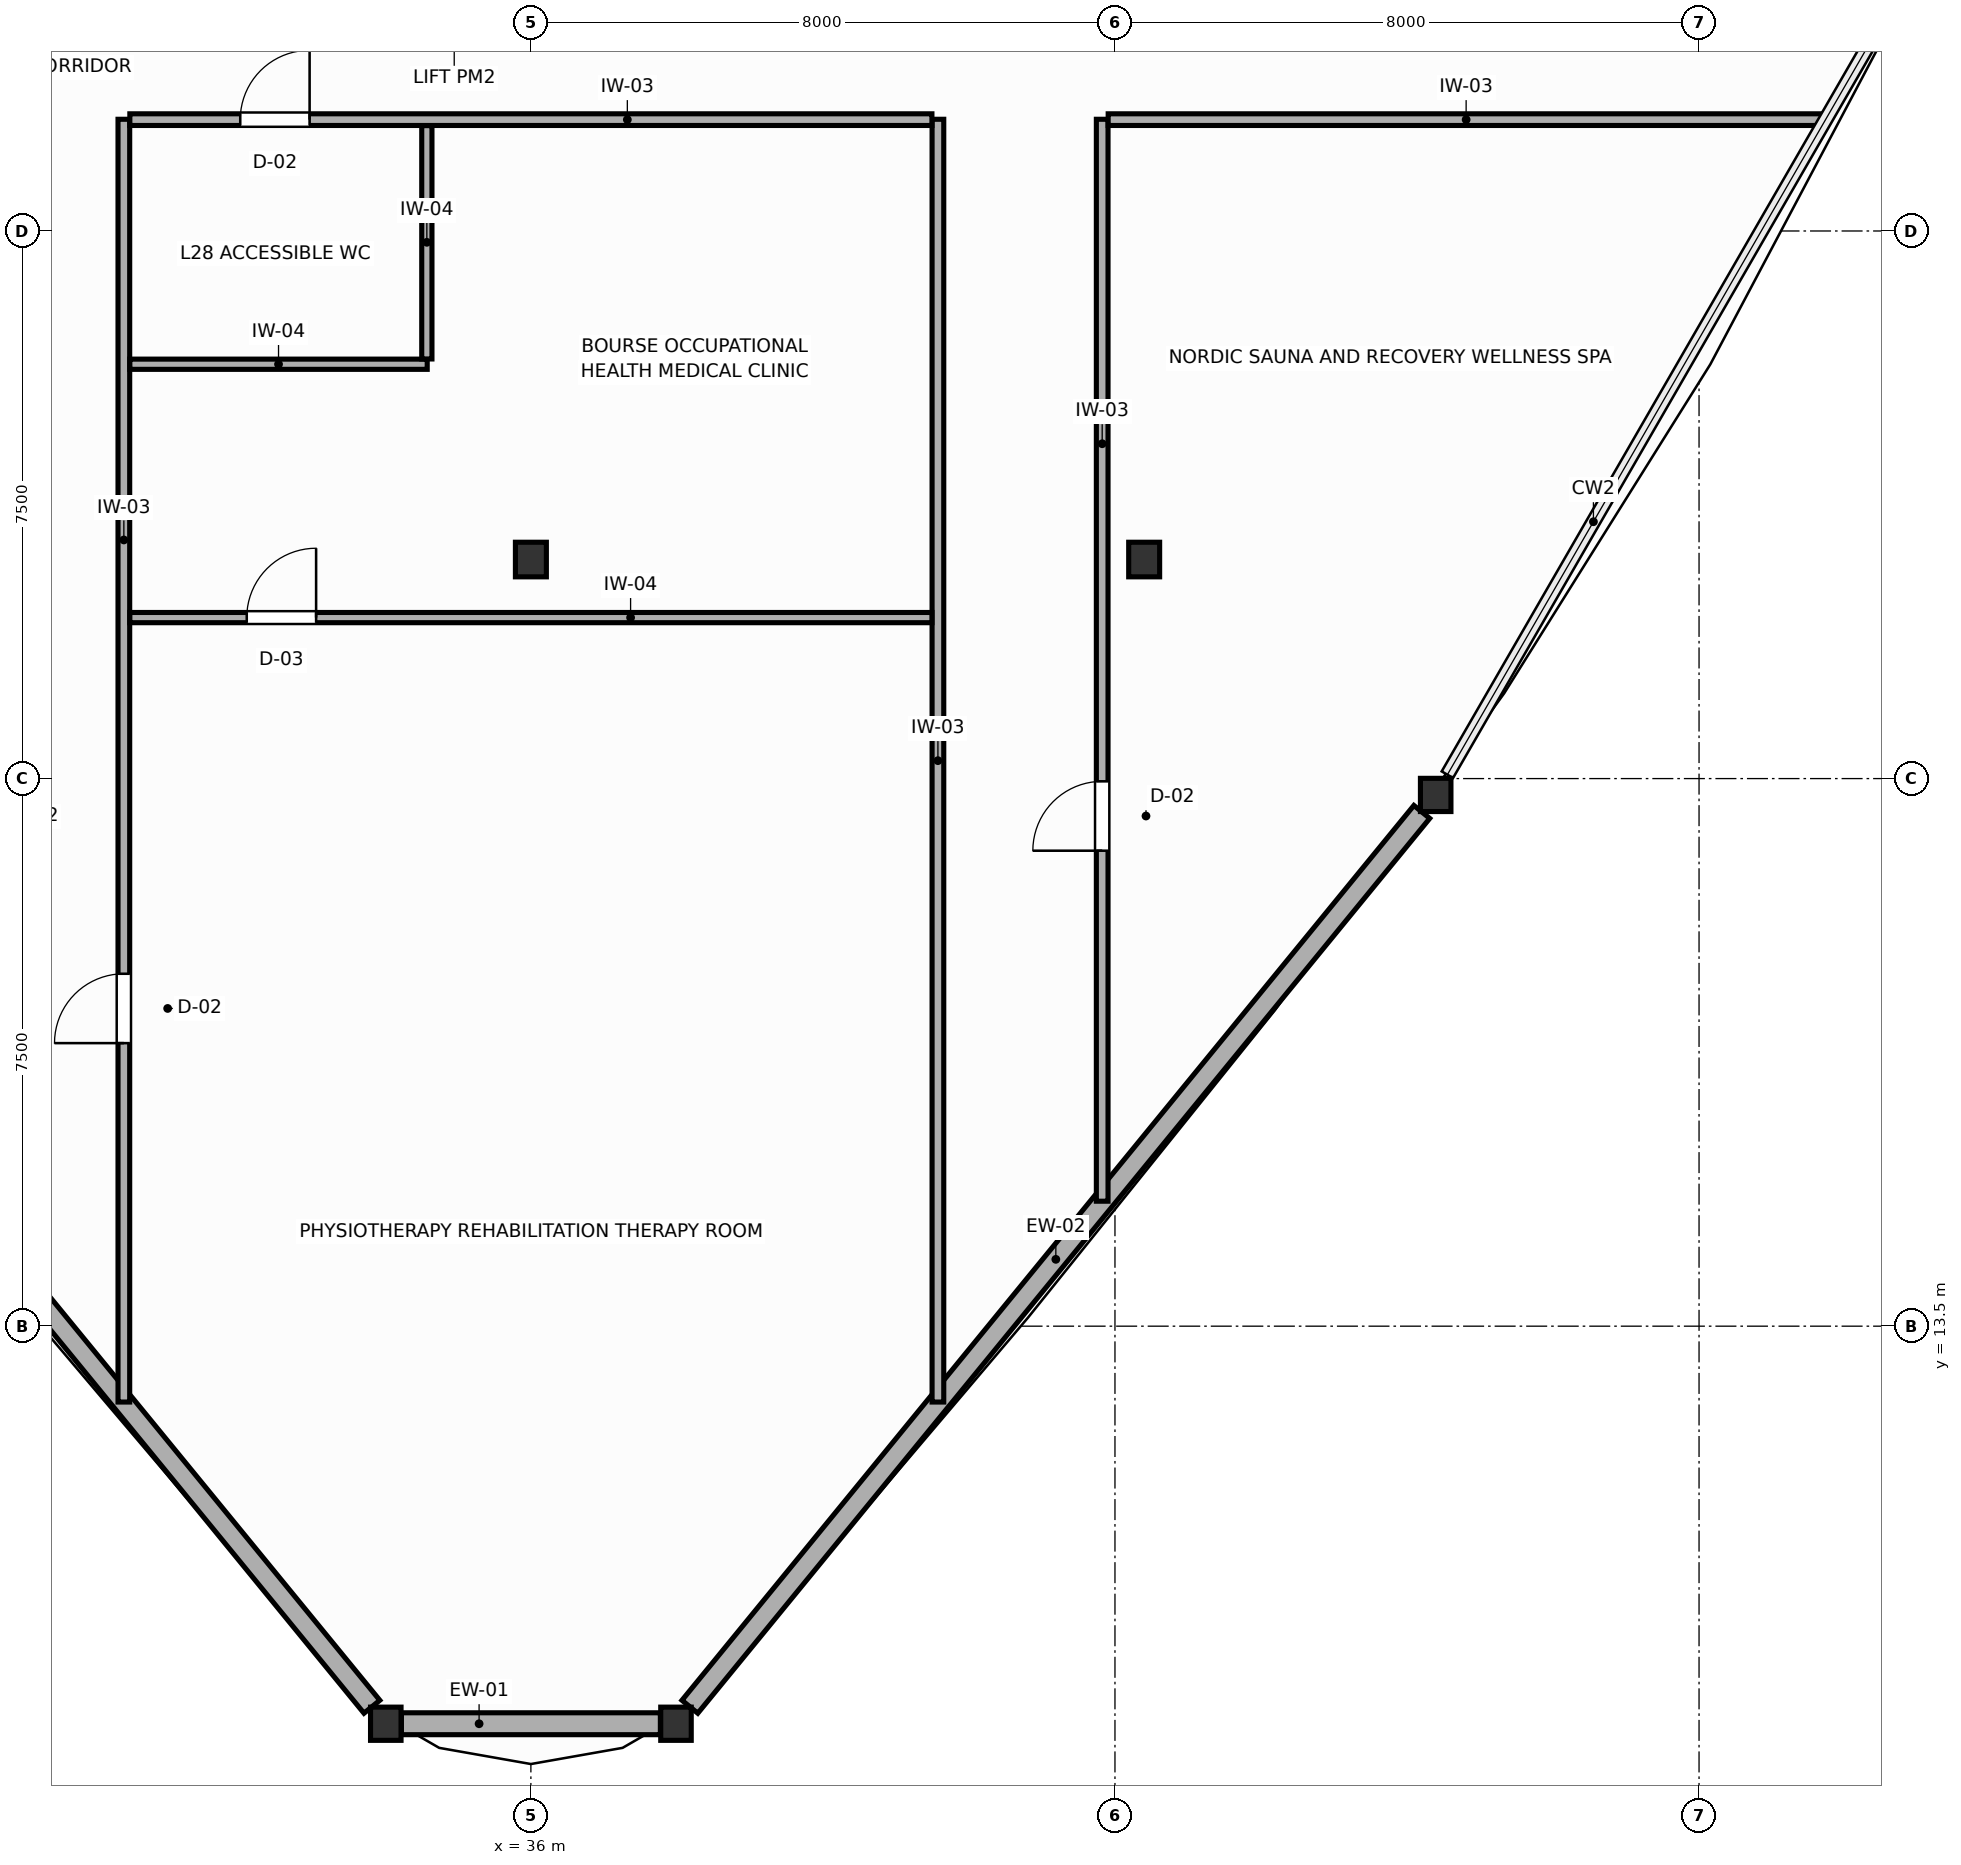
"""IFC4 building model, lengths in metres.
Left out: names, types, materials, properties, quantities, classifications, styles, units other than length and angle.
Written with IfcOpenShell. Run it as: python <this file> out.ifc"""

import sys

from ifc_helpers import new_model, si_unit, direction, frame, frame_2d, origin, origin_2d, place, context, subcontext, project, spatial, rectangle, i_section, extrude, source, transform, mapped, element, fill, save


model = new_model("IFC4")
c1 = context("Model", 3, precision=1e-05, world=origin(), true_north=direction((0.0, 1.0)))
c2 = subcontext(c1, "Body", "Model", "MODEL_VIEW")
j1 = project(units=[si_unit("LENGTHUNIT", "METRE"), si_unit("PLANEANGLEUNIT", "RADIAN")], contexts=[c1])
p1 = place(None, origin())
s1 = spatial("IfcSite", under=j1, at=p1, CompositionType="ELEMENT")
p2 = place(p1, origin())
s2 = spatial("IfcBuilding", under=s1, at=p2, CompositionType="ELEMENT")
p3 = place(p2, frame((0.0, 0.0, 113.4)))
s3 = spatial("IfcBuildingStorey", under=s2, at=p3, CompositionType="ELEMENT", Elevation=113.4)
m1 = source(origin(), c2, "Body", "SweptSolid", [
    extrude(i_section(OverallWidth=0.424, OverallDepth=0.474, WebThickness=0.045, FlangeThickness=0.072, FilletRadius=0.015, at=origin_2d()), origin(), (0.0, 0.0, 1.0), 3.6),
])
for number, where, z_axis, x_axis in (
    (1, (44.4, 24.0, 0.0), (0.0, 0.0, 1.0), (1.0, 0.0, 0.0)),
    (2, (36.0, 24.0, 0.0), (0.0, 0.0, 1.0), (1.0, 0.0, 0.0)),
):
    element("IfcColumn", number, at=place(p3, frame(where, z_axis=z_axis, x_axis=x_axis)), inside=s3, PredefinedType="COLUMN", context=c2, shape_type="MappedRepresentation", body=[
        mapped(m1, transform((0.0, 0.0, 0.0), scale=1.0)),
    ])
m2 = source(origin(), c2, "Body", "SweptSolid", [
    extrude(i_section(OverallWidth=0.418, OverallDepth=0.455, WebThickness=0.039, FlangeThickness=0.063, FilletRadius=0.015, at=origin_2d()), origin(), (0.0, 0.0, 1.0), 3.6),
])
for number, where, z_axis, x_axis in (
    (3, (34.013, 8.055, 0.0), (0.0, 0.0, 1.0), (1.0, 0.0, 0.0)),
    (4, (37.987, 8.055, 0.0), (0.0, 0.0, 1.0), (1.0, 0.0, 0.0)),
    (5, (48.393, 20.776, 0.0), (0.0, 0.0, 1.0), (1.0, 0.0, 0.0)),
):
    element("IfcColumn", number, at=place(p3, frame(where, z_axis=z_axis, x_axis=x_axis)), inside=s3, PredefinedType="COLUMN", context=c2, shape_type="MappedRepresentation", body=[
        mapped(m2, transform((0.0, 0.0, 0.0), scale=1.0)),
    ])
p4 = place(p3, frame((23.797, 20.543, 0.0), z_axis=(0.0, 0.0, 1.0), x_axis=(0.633140387555, -0.774036982092, 0.0)))
e6 = element("IfcWall", 6, at=p4, inside=s3, PredefinedType="SOLIDWALL", context=c2, shape_type="SweptSolid", body=[
    extrude(rectangle(XDim=15.834, YDim=0.28, at=frame_2d((7.917, 0.0))), origin(), (0.0, 0.0, 1.0), 1.87),
])
p5 = place(p3, frame((34.227, 8.055, 0.0), z_axis=(0.0, 0.0, 1.0), x_axis=(1.0, 0.0, 0.0)))
e7 = element("IfcWall", 7, at=p5, inside=s3, PredefinedType="SOLIDWALL", context=c2, shape_type="SweptSolid", body=[
    extrude(rectangle(XDim=3.547, YDim=0.3, at=frame_2d((1.773, 0.0))), origin(), (0.0, 0.0, 1.0), 1.87),
])
p6 = place(p3, frame((38.177, 8.287, 0.0), z_axis=(0.0, 0.0, 1.0), x_axis=(0.633140387555, 0.774036982092, 0.0)))
e8 = element("IfcWall", 8, at=p6, inside=s3, PredefinedType="SOLIDWALL", context=c2, shape_type="SweptSolid", body=[
    extrude(rectangle(XDim=15.834, YDim=0.28, at=frame_2d((7.917, 0.0))), origin(), (0.0, 0.0, 1.0), 1.87),
])
p7 = place(p3, frame((30.425, 12.461, 0.0), z_axis=(0.0, 0.0, 1.0), x_axis=(0.0, 1.0, 0.0)))
e9 = element("IfcWall", 9, at=p7, inside=s3, PredefinedType="PARTITIONING", context=c2, shape_type="SweptSolid", body=[
    extrude(rectangle(XDim=17.569, YDim=0.16, at=frame_2d((8.785, 0.0))), origin(), (0.0, 0.0, 1.0), 3.4),
])
p8 = place(p7, frame((4.916, 0.0, 0.0)))
e10 = element("IfcOpeningElement", 10, at=p8, cuts=e9, PredefinedType="OPENING", context=c2, shape_type="SweptSolid", body=[
    extrude(rectangle(XDim=0.95, YDim=2.05, at=frame_2d((0.475, 1.025))), frame((0.0, 0.09, 0.0), z_axis=(0.0, -1.0, 0.0), x_axis=(1.0, 0.0, 0.0)), (0.0, 0.0, 1.0), 0.18),
])
p9 = place(p3, frame((41.575, 12.461, 0.0), z_axis=(0.0, 0.0, 1.0), x_axis=(0.0, 1.0, 0.0)))
e11 = element("IfcWall", 11, at=p9, inside=s3, PredefinedType="PARTITIONING", context=c2, shape_type="SweptSolid", body=[
    extrude(rectangle(XDim=17.569, YDim=0.16, at=frame_2d((8.785, 0.0))), origin(), (0.0, 0.0, 1.0), 3.4),
])
p10 = place(p3, frame((43.825, 15.212, 0.0), z_axis=(0.0, 0.0, 1.0), x_axis=(0.0, 1.0, 0.0)))
e12 = element("IfcWall", 12, at=p10, inside=s3, PredefinedType="PARTITIONING", context=c2, shape_type="SweptSolid", body=[
    extrude(rectangle(XDim=14.818, YDim=0.16, at=frame_2d((7.409, 0.0))), origin(), (0.0, 0.0, 1.0), 3.4),
])
p11 = place(p10, frame((4.801, 0.0, 0.0)))
e13 = element("IfcOpeningElement", 13, at=p11, cuts=e12, PredefinedType="OPENING", context=c2, shape_type="SweptSolid", body=[
    extrude(rectangle(XDim=0.95, YDim=2.05, at=frame_2d((0.475, 1.025))), frame((0.0, 0.09, 0.0), z_axis=(0.0, -1.0, 0.0), x_axis=(1.0, 0.0, 0.0)), (0.0, 0.0, 1.0), 0.18),
])
p12 = place(p3, frame((30.507, 30.025, 0.0), z_axis=(0.0, 0.0, 1.0), x_axis=(1.0, 0.0, 0.0)))
e14 = element("IfcWall", 14, at=p12, inside=s3, PredefinedType="PARTITIONING", context=c2, shape_type="SweptSolid", body=[
    extrude(rectangle(XDim=10.986, YDim=0.16, at=frame_2d((5.493, 0.0))), origin(), (0.0, 0.0, 1.0), 3.4),
])
p13 = place(p12, frame((1.512, 0.0, 0.0)))
e15 = element("IfcOpeningElement", 15, at=p13, cuts=e14, PredefinedType="OPENING", context=c2, shape_type="SweptSolid", body=[
    extrude(rectangle(XDim=0.95, YDim=2.05, at=frame_2d((0.475, 1.025))), frame((0.0, 0.09, 0.0), z_axis=(0.0, -1.0, 0.0), x_axis=(1.0, 0.0, 0.0)), (0.0, 0.0, 1.0), 0.18),
])
p14 = place(p3, frame((43.907, 30.025, 0.0), z_axis=(0.0, 0.0, 1.0), x_axis=(1.0, 0.0, 0.0)))
e16 = element("IfcWall", 16, at=p14, inside=s3, PredefinedType="PARTITIONING", context=c2, shape_type="SweptSolid", body=[
    extrude(rectangle(XDim=9.806, YDim=0.16, at=frame_2d((4.903, 0.0))), origin(), (0.0, 0.0, 1.0), 3.4),
])
p15 = place(p3, frame((30.507, 23.205, 0.0), z_axis=(0.0, 0.0, 1.0), x_axis=(1.0, 0.0, 0.0)))
e17 = element("IfcWall", 17, at=p15, inside=s3, PredefinedType="PARTITIONING", context=c2, shape_type="SweptSolid", body=[
    extrude(rectangle(XDim=10.986, YDim=0.14, at=frame_2d((5.493, 0.0))), origin(), (0.0, 0.0, 1.0), 3.4),
])
p16 = place(p15, frame((1.601, 0.0, 0.0)))
e18 = element("IfcOpeningElement", 18, at=p16, cuts=e17, PredefinedType="OPENING", context=c2, shape_type="SweptSolid", body=[
    extrude(rectangle(XDim=0.95, YDim=2.05, at=frame_2d((0.475, 1.025))), frame((0.0, 0.08, 0.0), z_axis=(0.0, -1.0, 0.0), x_axis=(1.0, 0.0, 0.0)), (0.0, 0.0, 1.0), 0.16),
])
p17 = place(p3, frame((30.507, 26.675, 0.0), z_axis=(0.0, 0.0, 1.0), x_axis=(1.0, 0.0, 0.0)))
e19 = element("IfcWall", 19, at=p17, inside=s3, PredefinedType="PARTITIONING", context=c2, shape_type="SweptSolid", body=[
    extrude(rectangle(XDim=4.073, YDim=0.14, at=frame_2d((2.037, 0.0))), origin(), (0.0, 0.0, 1.0), 3.4),
])
p18 = place(p3, frame((34.575, 26.747, 0.0), z_axis=(0.0, 0.0, 1.0), x_axis=(0.0, 1.0, 0.0)))
e20 = element("IfcWall", 20, at=p18, inside=s3, PredefinedType="PARTITIONING", context=c2, shape_type="SweptSolid", body=[
    extrude(rectangle(XDim=3.196, YDim=0.14, at=frame_2d((1.598, 0.0))), origin(), (0.0, 0.0, 1.0), 3.4),
])
p19 = place(p8, origin())
e21 = element("IfcDoor", 21, at=p19, inside=s3, OperationType="SINGLE_SWING_LEFT", PredefinedType="DOOR", context=c2, shape_type="SweptSolid", body=[
    extrude(rectangle(XDim=0.95, YDim=2.05, at=frame_2d((0.475, 1.025))), frame((0.0, 0.025, 0.0), z_axis=(0.0, -1.0, 0.0), x_axis=(1.0, 0.0, 0.0)), (0.0, 0.0, 1.0), 0.05),
])
fill(e10, e21)
p20 = place(p11, origin())
e22 = element("IfcDoor", 22, at=p20, inside=s3, OperationType="SINGLE_SWING_LEFT", PredefinedType="DOOR", context=c2, shape_type="SweptSolid", body=[
    extrude(rectangle(XDim=0.95, YDim=2.05, at=frame_2d((0.475, 1.025))), frame((0.0, 0.025, 0.0), z_axis=(0.0, -1.0, 0.0), x_axis=(1.0, 0.0, 0.0)), (0.0, 0.0, 1.0), 0.05),
])
fill(e13, e22)
p21 = place(p13, origin())
e23 = element("IfcDoor", 23, at=p21, inside=s3, OperationType="SINGLE_SWING_RIGHT", PredefinedType="DOOR", context=c2, shape_type="SweptSolid", body=[
    extrude(rectangle(XDim=0.95, YDim=2.05, at=frame_2d((0.475, 1.025))), frame((0.0, 0.025, 0.0), z_axis=(0.0, -1.0, 0.0), x_axis=(1.0, 0.0, 0.0)), (0.0, 0.0, 1.0), 0.05),
])
fill(e15, e23)
p22 = place(p16, origin())
e24 = element("IfcDoor", 24, at=p22, inside=s3, OperationType="SINGLE_SWING_RIGHT", PredefinedType="DOOR", context=c2, shape_type="SweptSolid", body=[
    extrude(rectangle(XDim=0.95, YDim=2.05, at=frame_2d((0.475, 1.025))), frame((0.0, 0.025, 0.0), z_axis=(0.0, -1.0, 0.0), x_axis=(1.0, 0.0, 0.0)), (0.0, 0.0, 1.0), 0.05),
])
fill(e18, e24)
save(model, sys.argv[1])
